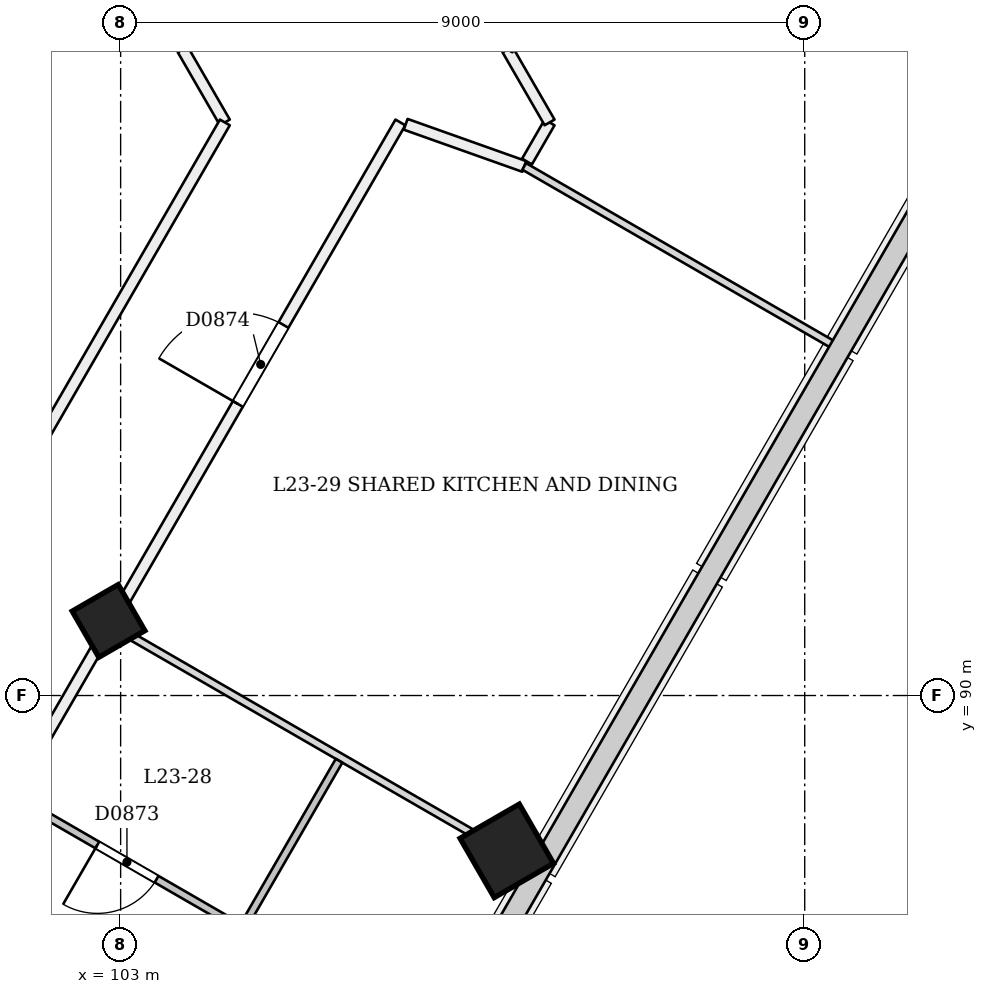
"""IFC4 building model, lengths in metres.
Left out: names, types, materials, properties, quantities, classifications, styles, units other than length and angle.
Written with IfcOpenShell. Run it as: python <this file> out.ifc"""

import sys

from ifc_helpers import new_model, si_unit, direction, frame, frame_2d, origin, origin_2d, place, context, subcontext, project, spatial, rectangle, extrude, element, fill, save


model = new_model("IFC4")
c1 = context("Model", 3, precision=1e-05, world=origin(), true_north=direction((0.0, 1.0)))
c2 = subcontext(c1, "Body", "Model", "MODEL_VIEW")
j1 = project(units=[si_unit("LENGTHUNIT", "METRE"), si_unit("PLANEANGLEUNIT", "RADIAN")], contexts=[c1])
p1 = place(None, origin())
s1 = spatial("IfcSite", under=j1, at=p1, CompositionType="ELEMENT")
p2 = place(p1, origin())
s2 = spatial("IfcBuilding", under=s1, at=p2, CompositionType="ELEMENT")
p3 = place(p2, frame((0.0, 0.0, 91.8)))
s3 = spatial("IfcBuildingStorey", under=s2, at=p3, CompositionType="ELEMENT", Elevation=91.8)
p4 = place(p3, frame((102.868, 90.934, -0.021), z_axis=(-0.022155133694, 0.038483534979, 0.999013597298), x_axis=(-0.501312238363, -0.864981546016, 0.02220280883)))
e1 = element("IfcColumn", 1, at=p4, inside=s3, PredefinedType="COLUMN", context=c2, shape_type="SweptSolid", body=[
    extrude(rectangle(XDim=0.7, YDim=0.7, at=origin_2d()), origin(), (0.0, 0.0, 1.0), 3.604),
])
p5 = place(p3, frame((108.108, 87.909, -0.027), z_axis=(-0.022189843276, 0.038462395012, 0.999013641061), x_axis=(-0.500520609867, -0.865439874439, 0.022202315873)))
e2 = element("IfcColumn", 2, at=p5, inside=s3, PredefinedType="COLUMN", context=c2, shape_type="SweptSolid", body=[
    extrude(rectangle(XDim=0.9, YDim=0.9, at=origin_2d()), origin(), (0.0, 0.0, 1.0), 3.631),
])
p6 = place(p3, frame((85.554, 60.948, 0.0), z_axis=(0.0, 0.0, 1.0), x_axis=(0.500001382442, 0.86602460563, 0.0)))
e3 = element("IfcWall", 3, at=p6, inside=s3, PredefinedType="PARTITIONING", context=c2, shape_type="SweptSolid", body=[
    extrude(rectangle(XDim=42.252, YDim=0.15, at=frame_2d((21.126, 0.0))), origin(), (0.0, 0.0, 1.0), 2.9),
])
p7 = place(p6, frame((0.285, 0.0, 0.0)))
e4 = element("IfcOpeningElement", 4, at=p7, cuts=e3, PredefinedType="OPENING", context=c2, shape_type="SweptSolid", body=[
    extrude(rectangle(XDim=1.2, YDim=2.1, at=frame_2d((0.6, 1.05))), frame((0.0, 0.085, 0.0), z_axis=(0.0, -1.0, 0.0), x_axis=(1.0, 0.0, 0.0)), (0.0, 0.0, 1.0), 0.171),
])
p8 = place(p6, frame((3.731, 0.0, 0.0)))
e5 = element("IfcOpeningElement", 5, at=p8, cuts=e3, PredefinedType="OPENING", context=c2, shape_type="SweptSolid", body=[
    extrude(rectangle(XDim=1.0, YDim=2.1, at=frame_2d((0.5, 1.05))), frame((0.0, 0.085, 0.0), z_axis=(0.0, -1.0, 0.0), x_axis=(1.0, 0.0, 0.0)), (0.0, 0.0, 1.0), 0.171),
])
p9 = place(p6, frame((11.526, 0.0, 0.0)))
e6 = element("IfcOpeningElement", 6, at=p9, cuts=e3, PredefinedType="OPENING", context=c2, shape_type="SweptSolid", body=[
    extrude(rectangle(XDim=1.2, YDim=2.1, at=frame_2d((0.6, 1.05))), frame((0.0, 0.085, 0.0), z_axis=(0.0, -1.0, 0.0), x_axis=(1.0, 0.0, 0.0)), (0.0, 0.0, 1.0), 0.171),
])
p10 = place(p6, frame((18.376, 0.0, 0.0)))
e7 = element("IfcOpeningElement", 7, at=p10, cuts=e3, PredefinedType="OPENING", context=c2, shape_type="SweptSolid", body=[
    extrude(rectangle(XDim=1.0, YDim=2.1, at=frame_2d((0.5, 1.05))), frame((0.0, 0.085, 0.0), z_axis=(0.0, -1.0, 0.0), x_axis=(1.0, 0.0, 0.0)), (0.0, 0.0, 1.0), 0.171),
])
p11 = place(p6, frame((21.731, 0.0, 0.0)))
e8 = element("IfcOpeningElement", 8, at=p11, cuts=e3, PredefinedType="OPENING", context=c2, shape_type="SweptSolid", body=[
    extrude(rectangle(XDim=1.0, YDim=2.1, at=frame_2d((0.5, 1.05))), frame((0.0, 0.085, 0.0), z_axis=(0.0, -1.0, 0.0), x_axis=(1.0, 0.0, 0.0)), (0.0, 0.0, 1.0), 0.171),
])
p12 = place(p6, frame((27.376, 0.0, 0.0)))
e9 = element("IfcOpeningElement", 9, at=p12, cuts=e3, PredefinedType="OPENING", context=c2, shape_type="SweptSolid", body=[
    extrude(rectangle(XDim=1.0, YDim=2.1, at=frame_2d((0.5, 1.05))), frame((0.0, 0.085, 0.0), z_axis=(0.0, -1.0, 0.0), x_axis=(1.0, 0.0, 0.0)), (0.0, 0.0, 1.0), 0.171),
])
p13 = place(p6, frame((30.697, 0.0, 0.0)))
e10 = element("IfcOpeningElement", 10, at=p13, cuts=e3, PredefinedType="OPENING", context=c2, shape_type="SweptSolid", body=[
    extrude(rectangle(XDim=1.1, YDim=2.1, at=frame_2d((0.55, 1.05))), frame((0.0, 0.085, 0.0), z_axis=(0.0, -1.0, 0.0), x_axis=(1.0, 0.0, 0.0)), (0.0, 0.0, 1.0), 0.171),
])
p14 = place(p6, frame((37.976, 0.0, 0.0)))
e11 = element("IfcOpeningElement", 11, at=p14, cuts=e3, PredefinedType="OPENING", context=c2, shape_type="SweptSolid", body=[
    extrude(rectangle(XDim=1.2, YDim=2.1, at=frame_2d((0.6, 1.05))), frame((0.0, 0.085, 0.0), z_axis=(0.0, -1.0, 0.0), x_axis=(1.0, 0.0, 0.0)), (0.0, 0.0, 1.0), 0.171),
])
p15 = place(p3, frame((106.75, 97.515, 0.0), z_axis=(0.0, 0.0, 1.0), x_axis=(0.942304690634, -0.334756433858, 0.0)))
e12 = element("IfcWall", 12, at=p15, inside=s3, PredefinedType="PARTITIONING", context=c2, shape_type="SweptSolid", body=[
    extrude(rectangle(XDim=1.655, YDim=0.15, at=frame_2d((0.827, 0.0))), origin(), (0.0, 0.0, 1.0), 3.3),
])
p16 = place(p3, frame((108.346, 97.025, 0.0), z_axis=(0.0, 0.0, 1.0), x_axis=(0.499983247966, 0.86603507536, 0.0)))
e13 = element("IfcWall", 13, at=p16, inside=s3, PredefinedType="PARTITIONING", context=c2, shape_type="SweptSolid", body=[
    extrude(rectangle(XDim=0.594, YDim=0.15, at=frame_2d((0.297, 0.0))), origin(), (0.0, 0.0, 1.0), 3.3),
])
p17 = place(p3, frame((108.644, 97.54, 0.0), z_axis=(0.0, 0.0, 1.0), x_axis=(-0.499951133605, 0.866053614973, 0.0)))
e14 = element("IfcWall", 14, at=p17, inside=s3, PredefinedType="PARTITIONING", context=c2, shape_type="SweptSolid", body=[
    extrude(rectangle(XDim=1.109, YDim=0.15, at=frame_2d((0.554, 0.0))), origin(), (0.0, 0.0, 1.0), 3.3),
])
p18 = place(p3, frame((108.089, 98.5, 0.0), z_axis=(0.0, 0.0, 1.0), x_axis=(0.499951854219, 0.86605319898, 0.0)))
e15 = element("IfcWall", 15, at=p18, inside=s3, PredefinedType="PARTITIONING", context=c2, shape_type="SweptSolid", body=[
    extrude(rectangle(XDim=1.873, YDim=0.15, at=frame_2d((0.937, 0.0))), origin(), (0.0, 0.0, 1.0), 3.3),
])
p19 = place(p3, frame((104.971, 100.5, 0.0), z_axis=(0.0, 0.0, 1.0), x_axis=(-0.500027479704, -0.866009537788, 0.0)))
e16 = element("IfcWall", 16, at=p19, inside=s3, PredefinedType="PARTITIONING", context=c2, shape_type="SweptSolid", body=[
    extrude(rectangle(XDim=2.309, YDim=0.15, at=frame_2d((1.155, 0.0))), origin(), (0.0, 0.0, 1.0), 3.3),
])
p20 = place(p3, frame((103.817, 98.5, 0.0), z_axis=(0.0, 0.0, 1.0), x_axis=(0.50011622646, -0.865958290007, 0.0)))
e17 = element("IfcWall", 17, at=p20, inside=s3, PredefinedType="PARTITIONING", context=c2, shape_type="SweptSolid", body=[
    extrude(rectangle(XDim=1.109, YDim=0.15, at=frame_2d((0.555, 0.0))), origin(), (0.0, 0.0, 1.0), 3.3),
])
p21 = place(p3, frame((104.371, 97.54, 0.0), z_axis=(0.0, 0.0, 1.0), x_axis=(-0.500019194352, -0.866014321637, 0.0)))
e18 = element("IfcWall", 18, at=p21, inside=s3, PredefinedType="PARTITIONING", context=c2, shape_type="SweptSolid", body=[
    extrude(rectangle(XDim=5.935, YDim=0.15, at=frame_2d((2.967, 0.0))), origin(), (0.0, 0.0, 1.0), 3.3),
])
p22 = place(p3, frame((105.874, 89.142, 0.0), z_axis=(0.0, 0.0, 1.0), x_axis=(-0.499990435942, -0.866030925526, 0.0)))
e19 = element("IfcWall", 19, at=p22, inside=s3, PredefinedType="PARTITIONING", context=c2, shape_type="SweptSolid", body=[
    extrude(rectangle(XDim=2.55, YDim=0.1, at=frame_2d((1.275, 0.0))), origin(), (0.0, 0.0, 1.0), 2.9),
])
p23 = place(p3, frame((104.599, 86.934, 0.0), z_axis=(0.0, 0.0, 1.0), x_axis=(-0.866032454348, 0.499987787867, 0.0)))
e20 = element("IfcWall", 20, at=p23, inside=s3, PredefinedType="PARTITIONING", context=c2, shape_type="SweptSolid", body=[
    extrude(rectangle(XDim=3.425, YDim=0.1, at=frame_2d((1.712, 0.0))), origin(), (0.0, 0.0, 1.0), 3.3),
])
p24 = place(p23, frame((1.3, 0.0, 0.0)))
e21 = element("IfcOpeningElement", 21, at=p24, cuts=e20, PredefinedType="OPENING", context=c2, shape_type="SweptSolid", body=[
    extrude(rectangle(XDim=0.9, YDim=2.1, at=frame_2d((0.45, 1.05))), frame((0.0, 0.061, 0.0), z_axis=(0.0, -1.0, 0.0), x_axis=(1.0, 0.0, 0.0)), (0.0, 0.0, 1.0), 0.121),
])
p25 = place(p3, frame((108.41, 87.735, 0.0), z_axis=(0.0, 0.0, 1.0), x_axis=(-0.866015887322, 0.500016482634, 0.0)))
e22 = element("IfcWall", 22, at=p25, inside=s3, PredefinedType="PARTITIONING", context=c2, shape_type="SweptSolid", body=[
    extrude(rectangle(XDim=6.325, YDim=0.1, at=frame_2d((3.163, 0.0))), origin(), (0.0, 0.0, 1.0), 2.9),
])
p26 = place(p3, frame((112.397, 94.601, 0.0), z_axis=(0.0, 0.0, 1.0), x_axis=(-0.866028828302, 0.499994068514, 0.0)))
e23 = element("IfcWall", 23, at=p26, inside=s3, PredefinedType="PARTITIONING", context=c2, shape_type="SweptSolid", body=[
    extrude(rectangle(XDim=4.72, YDim=0.1, at=frame_2d((2.36, 0.0))), origin(), (0.0, 0.0, 1.0), 3.3),
])
p27 = place(p24, origin())
e24 = element("IfcDoor", 24, at=p27, inside=s3, OperationType="SINGLE_SWING_RIGHT", PredefinedType="NOTDEFINED", context=c2, shape_type="SweptSolid", body=[
    extrude(rectangle(XDim=0.9, YDim=2.1, at=frame_2d((0.45, 1.05))), frame((0.0, 0.025, 0.0), z_axis=(0.0, -1.0, 0.0), x_axis=(1.0, 0.0, 0.0)), (0.0, 0.0, 1.0), 0.05),
])
fill(e21, e24)
p28 = place(p14, origin())
e25 = element("IfcDoor", 25, at=p28, inside=s3, OperationType="SINGLE_SWING_LEFT", PredefinedType="NOTDEFINED", context=c2, shape_type="SweptSolid", body=[
    extrude(rectangle(XDim=1.2, YDim=2.1, at=frame_2d((0.6, 1.05))), frame((0.0, 0.025, 0.0), z_axis=(0.0, -1.0, 0.0), x_axis=(1.0, 0.0, 0.0)), (0.0, 0.0, 1.0), 0.05),
])
fill(e11, e25)
save(model, sys.argv[1])
